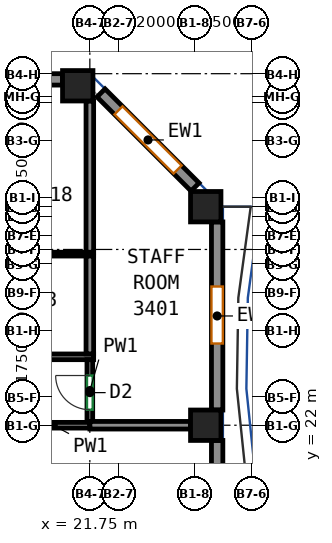
"""IFC4 building model, lengths in metres.
Left out: names, types, materials, properties, quantities, classifications, styles, units other than length and angle.
Written with IfcOpenShell. Run it as: python <this file> out.ifc"""

import sys

from ifc_helpers import new_model, si_unit, direction, frame, frame_2d, origin, origin_2d, place, context, subcontext, project, spatial, rectangle, extrude, source, transform, mapped, element, fill, save


model = new_model("IFC4")
c1 = context("Model", 3, precision=1e-05, world=origin(), true_north=direction((0.0, 1.0)))
c2 = subcontext(c1, "Body", "Model", "MODEL_VIEW")
j1 = project(units=[si_unit("LENGTHUNIT", "METRE"), si_unit("PLANEANGLEUNIT", "RADIAN")], contexts=[c1])
p1 = place(None, origin())
s1 = spatial("IfcSite", under=j1, at=p1, CompositionType="ELEMENT")
p2 = place(p1, origin())
s2 = spatial("IfcBuilding", under=s1, at=p2, CompositionType="ELEMENT")
p3 = place(p2, frame((0.0, 0.0, 150.7)))
s3 = spatial("IfcBuildingStorey", under=s2, at=p3, CompositionType="ELEMENT", Elevation=150.7)
m1 = source(origin(), c2, "Body", "SweptSolid", [
    extrude(rectangle(XDim=0.8, YDim=0.8, at=origin_2d()), origin(), (0.0, 0.0, 1.0), 3.12),
])
for number, where, z_axis, x_axis in (
    (1, (21.432, 30.932, 0.0), (0.0, 0.0, 1.0), (1.0, 0.0, 0.0)),
    (2, (24.8, 22.0, 0.0), (0.0, 0.0, 1.0), (1.0, 0.0, 0.0)),
    (3, (24.8, 27.75, 0.0), (0.0, 0.0, 1.0), (1.0, 0.0, 0.0)),
):
    element("IfcColumn", number, at=place(p3, frame(where, z_axis=z_axis, x_axis=x_axis)), inside=s3, PredefinedType="COLUMN", context=c2, shape_type="MappedRepresentation", body=[
        mapped(m1, transform((0.0, 0.0, 0.0))),
    ])
m2 = source(origin(), c2, "Body", "SweptSolid", [
    extrude(rectangle(XDim=13.2, YDim=0.3, at=frame_2d((6.6, 0.0))), origin(), (0.0, 0.0, 1.0), 3.12),
])
p4 = place(p3, frame((25.1, 8.4, 0.0), z_axis=(0.0, 0.0, 1.0), x_axis=(0.0, 1.0, 0.0)))
e4 = element("IfcWall", 4, at=p4, inside=s3, PredefinedType="SOLIDWALL", context=c2, shape_type="MappedRepresentation", body=[
    mapped(m2, transform((0.0, 0.0, 0.0))),
])
p5 = place(p4, frame((0.9, 0.0, 0.85)))
e5 = element("IfcOpeningElement", 5, at=p5, cuts=e4, PredefinedType="OPENING", context=c2, shape_type="SweptSolid", body=[
    extrude(rectangle(XDim=1.5, YDim=1.95, at=frame_2d((0.75, 0.975))), frame((0.0, 0.16, 0.0), z_axis=(0.0, -1.0, 0.0), x_axis=(1.0, 0.0, 0.0)), (0.0, 0.0, 1.0), 0.32),
])
p6 = place(p4, frame((4.2, 0.0, 0.85)))
e6 = element("IfcOpeningElement", 6, at=p6, cuts=e4, PredefinedType="OPENING", context=c2, shape_type="SweptSolid", body=[
    extrude(rectangle(XDim=1.5, YDim=1.95, at=frame_2d((0.75, 0.975))), frame((0.0, 0.16, 0.0), z_axis=(0.0, -1.0, 0.0), x_axis=(1.0, 0.0, 0.0)), (0.0, 0.0, 1.0), 0.32),
])
p7 = place(p4, frame((7.5, 0.0, 0.85)))
e7 = element("IfcOpeningElement", 7, at=p7, cuts=e4, PredefinedType="OPENING", context=c2, shape_type="SweptSolid", body=[
    extrude(rectangle(XDim=1.5, YDim=1.95, at=frame_2d((0.75, 0.975))), frame((0.0, 0.16, 0.0), z_axis=(0.0, -1.0, 0.0), x_axis=(1.0, 0.0, 0.0)), (0.0, 0.0, 1.0), 0.32),
])
p8 = place(p4, frame((10.8, 0.0, 0.85)))
e8 = element("IfcOpeningElement", 8, at=p8, cuts=e4, PredefinedType="OPENING", context=c2, shape_type="SweptSolid", body=[
    extrude(rectangle(XDim=1.5, YDim=1.95, at=frame_2d((0.75, 0.975))), frame((0.0, 0.16, 0.0), z_axis=(0.0, -1.0, 0.0), x_axis=(1.0, 0.0, 0.0)), (0.0, 0.0, 1.0), 0.32),
])
m3 = source(origin(), c2, "Body", "SweptSolid", [
    extrude(rectangle(XDim=4.95, YDim=0.3, at=frame_2d((2.475, 0.0))), origin(), (0.0, 0.0, 1.0), 3.12),
])
p9 = place(p3, frame((25.1, 22.4, 0.0), z_axis=(0.0, 0.0, 1.0), x_axis=(0.0, 1.0, 0.0)))
e9 = element("IfcWall", 9, at=p9, inside=s3, PredefinedType="SOLIDWALL", context=c2, shape_type="MappedRepresentation", body=[
    mapped(m3, transform((0.0, 0.0, 0.0))),
])
p10 = place(p9, frame((1.75, 0.0, 0.85)))
e10 = element("IfcOpeningElement", 10, at=p10, cuts=e9, PredefinedType="OPENING", context=c2, shape_type="SweptSolid", body=[
    extrude(rectangle(XDim=1.5, YDim=1.95, at=frame_2d((0.75, 0.975))), frame((0.0, 0.16, 0.0), z_axis=(0.0, -1.0, 0.0), x_axis=(1.0, 0.0, 0.0)), (0.0, 0.0, 1.0), 0.32),
])
m4 = source(origin(), c2, "Body", "SweptSolid", [
    extrude(rectangle(XDim=3.5, YDim=0.3, at=frame_2d((1.75, 0.0))), origin(), (0.0, 0.0, 1.0), 3.12),
])
p11 = place(p3, frame((24.519, 28.269, 0.0), z_axis=(0.0, 0.0, 1.0), x_axis=(-0.70707190453, 0.707141656123, 0.0)))
e11 = element("IfcWall", 11, at=p11, inside=s3, PredefinedType="SOLIDWALL", context=c2, shape_type="MappedRepresentation", body=[
    mapped(m4, transform((0.0, 0.0, 0.0))),
])
p12 = place(p11, frame((0.65, 0.0, 0.85)))
e12 = element("IfcOpeningElement", 12, at=p12, cuts=e11, PredefinedType="OPENING", context=c2, shape_type="SweptSolid", body=[
    extrude(rectangle(XDim=2.2, YDim=1.95, at=frame_2d((1.1, 0.975))), frame((0.0, 0.16, 0.0), z_axis=(0.0, -1.0, 0.0), x_axis=(1.0, 0.0, 0.0)), (0.0, 0.0, 1.0), 0.32),
])
m5 = source(origin(), c2, "Body", "SweptSolid", [
    extrude(rectangle(XDim=6.465, YDim=0.3, at=frame_2d((3.232, 0.0))), origin(), (0.0, 0.0, 1.0), 3.12),
])
p13 = place(p3, frame((21.032, 31.1, 0.0), z_axis=(0.0, 0.0, 1.0), x_axis=(-1.0, 0.0, 0.0)))
e13 = element("IfcWall", 13, at=p13, inside=s3, PredefinedType="SOLIDWALL", context=c2, shape_type="MappedRepresentation", body=[
    mapped(m5, transform((0.0, 0.0, 0.0))),
])
p14 = place(p13, frame((0.516, 0.0, 0.85)))
e14 = element("IfcOpeningElement", 14, at=p14, cuts=e13, PredefinedType="OPENING", context=c2, shape_type="SweptSolid", body=[
    extrude(rectangle(XDim=2.2, YDim=1.95, at=frame_2d((1.1, 0.975))), frame((0.0, 0.16, 0.0), z_axis=(0.0, -1.0, 0.0), x_axis=(1.0, 0.0, 0.0)), (0.0, 0.0, 1.0), 0.32),
])
p15 = place(p13, frame((3.749, 0.0, 0.85)))
e15 = element("IfcOpeningElement", 15, at=p15, cuts=e13, PredefinedType="OPENING", context=c2, shape_type="SweptSolid", body=[
    extrude(rectangle(XDim=2.2, YDim=1.95, at=frame_2d((1.1, 0.975))), frame((0.0, 0.16, 0.0), z_axis=(0.0, -1.0, 0.0), x_axis=(1.0, 0.0, 0.0)), (0.0, 0.0, 1.0), 0.32),
])
p16 = place(p3, frame((-20.059, 23.8, 0.0), z_axis=(0.0, 0.0, 1.0), x_axis=(1.0, 0.0, 0.0)))
e16 = element("IfcWall", 16, at=p16, inside=s3, PredefinedType="PARTITIONING", context=c2, shape_type="SweptSolid", body=[
    extrude(rectangle(XDim=41.909, YDim=0.15, at=frame_2d((20.955, 0.0))), origin(), (0.0, 0.0, 1.0), 3.12),
])
p17 = place(p16, frame((0.3, 0.0, 0.0)))
e17 = element("IfcOpeningElement", 17, at=p17, cuts=e16, PredefinedType="OPENING", context=c2, shape_type="SweptSolid", body=[
    extrude(rectangle(XDim=1.0, YDim=2.1, at=frame_2d((0.5, 1.05))), frame((0.0, 0.085, 0.0), z_axis=(0.0, -1.0, 0.0), x_axis=(1.0, 0.0, 0.0)), (0.0, 0.0, 1.0), 0.17),
])
p18 = place(p16, frame((6.391, 0.0, 0.0)))
e18 = element("IfcOpeningElement", 18, at=p18, cuts=e16, PredefinedType="OPENING", context=c2, shape_type="SweptSolid", body=[
    extrude(rectangle(XDim=1.0, YDim=2.1, at=frame_2d((0.5, 1.05))), frame((0.0, 0.085, 0.0), z_axis=(0.0, -1.0, 0.0), x_axis=(1.0, 0.0, 0.0)), (0.0, 0.0, 1.0), 0.17),
])
p19 = place(p16, frame((8.183, 0.0, 0.0)))
e19 = element("IfcOpeningElement", 19, at=p19, cuts=e16, PredefinedType="OPENING", context=c2, shape_type="SweptSolid", body=[
    extrude(rectangle(XDim=1.0, YDim=2.1, at=frame_2d((0.5, 1.05))), frame((0.0, 0.085, 0.0), z_axis=(0.0, -1.0, 0.0), x_axis=(1.0, 0.0, 0.0)), (0.0, 0.0, 1.0), 0.17),
])
p20 = place(p16, frame((13.872, 0.0, 0.0)))
e20 = element("IfcOpeningElement", 20, at=p20, cuts=e16, PredefinedType="OPENING", context=c2, shape_type="SweptSolid", body=[
    extrude(rectangle(XDim=1.0, YDim=2.1, at=frame_2d((0.5, 1.05))), frame((0.0, 0.085, 0.0), z_axis=(0.0, -1.0, 0.0), x_axis=(1.0, 0.0, 0.0)), (0.0, 0.0, 1.0), 0.17),
])
p21 = place(p16, frame((15.457, 0.0, 0.0)))
e21 = element("IfcOpeningElement", 21, at=p21, cuts=e16, PredefinedType="OPENING", context=c2, shape_type="SweptSolid", body=[
    extrude(rectangle(XDim=1.0, YDim=2.1, at=frame_2d((0.5, 1.05))), frame((0.0, 0.085, 0.0), z_axis=(0.0, -1.0, 0.0), x_axis=(1.0, 0.0, 0.0)), (0.0, 0.0, 1.0), 0.17),
])
p22 = place(p16, frame((21.199, 0.0, 0.0)))
e22 = element("IfcOpeningElement", 22, at=p22, cuts=e16, PredefinedType="OPENING", context=c2, shape_type="SweptSolid", body=[
    extrude(rectangle(XDim=1.0, YDim=2.1, at=frame_2d((0.5, 1.05))), frame((0.0, 0.085, 0.0), z_axis=(0.0, -1.0, 0.0), x_axis=(1.0, 0.0, 0.0)), (0.0, 0.0, 1.0), 0.17),
])
p23 = place(p16, frame((23.212, 0.0, 0.0)))
e23 = element("IfcOpeningElement", 23, at=p23, cuts=e16, PredefinedType="OPENING", context=c2, shape_type="SweptSolid", body=[
    extrude(rectangle(XDim=1.0, YDim=2.1, at=frame_2d((0.5, 1.05))), frame((0.0, 0.085, 0.0), z_axis=(0.0, -1.0, 0.0), x_axis=(1.0, 0.0, 0.0)), (0.0, 0.0, 1.0), 0.17),
])
p24 = place(p16, frame((28.832, 0.0, 0.0)))
e24 = element("IfcOpeningElement", 24, at=p24, cuts=e16, PredefinedType="OPENING", context=c2, shape_type="SweptSolid", body=[
    extrude(rectangle(XDim=1.0, YDim=2.1, at=frame_2d((0.5, 1.05))), frame((0.0, 0.085, 0.0), z_axis=(0.0, -1.0, 0.0), x_axis=(1.0, 0.0, 0.0)), (0.0, 0.0, 1.0), 0.17),
])
p25 = place(p16, frame((30.83, 0.0, 0.0)))
e25 = element("IfcOpeningElement", 25, at=p25, cuts=e16, PredefinedType="OPENING", context=c2, shape_type="SweptSolid", body=[
    extrude(rectangle(XDim=1.0, YDim=2.1, at=frame_2d((0.5, 1.05))), frame((0.0, 0.085, 0.0), z_axis=(0.0, -1.0, 0.0), x_axis=(1.0, 0.0, 0.0)), (0.0, 0.0, 1.0), 0.17),
])
p26 = place(p16, frame((36.519, 0.0, 0.0)))
e26 = element("IfcOpeningElement", 26, at=p26, cuts=e16, PredefinedType="OPENING", context=c2, shape_type="SweptSolid", body=[
    extrude(rectangle(XDim=1.0, YDim=2.1, at=frame_2d((0.5, 1.05))), frame((0.0, 0.085, 0.0), z_axis=(0.0, -1.0, 0.0), x_axis=(1.0, 0.0, 0.0)), (0.0, 0.0, 1.0), 0.17),
])
p27 = place(p16, frame((38.311, 0.0, 0.0)))
e27 = element("IfcOpeningElement", 27, at=p27, cuts=e16, PredefinedType="OPENING", context=c2, shape_type="SweptSolid", body=[
    extrude(rectangle(XDim=1.0, YDim=2.1, at=frame_2d((0.5, 1.05))), frame((0.0, 0.085, 0.0), z_axis=(0.0, -1.0, 0.0), x_axis=(1.0, 0.0, 0.0)), (0.0, 0.0, 1.0), 0.17),
])
p28 = place(p3, frame((21.75, 22.1, 0.0), z_axis=(0.0, 0.0, 1.0), x_axis=(0.0, 1.0, 0.0)))
e28 = element("IfcWall", 28, at=p28, inside=s3, PredefinedType="PARTITIONING", context=c2, shape_type="SweptSolid", body=[
    extrude(rectangle(XDim=1.625, YDim=0.15, at=frame_2d((0.812, 0.0))), origin(), (0.0, 0.0, 1.0), 3.12),
])
p29 = place(p28, frame((0.308, 0.0, 0.0)))
e29 = element("IfcOpeningElement", 29, at=p29, cuts=e28, PredefinedType="OPENING", context=c2, shape_type="SweptSolid", body=[
    extrude(rectangle(XDim=0.9, YDim=2.1, at=frame_2d((0.45, 1.05))), frame((0.0, 0.085, 0.0), z_axis=(0.0, -1.0, 0.0), x_axis=(1.0, 0.0, 0.0)), (0.0, 0.0, 1.0), 0.17),
])
p30 = place(p3, frame((19.825, 22.0, 0.0), z_axis=(0.0, 0.0, 1.0), x_axis=(1.0, 0.0, 0.0)))
e30 = element("IfcWall", 30, at=p30, inside=s3, PredefinedType="PARTITIONING", context=c2, shape_type="SweptSolid", body=[
    extrude(rectangle(XDim=1.925, YDim=0.15, at=frame_2d((0.962, 0.0))), origin(), (0.0, 0.0, 1.0), 3.12),
])
p31 = place(p3, frame((19.7, 26.502, 0.0), z_axis=(0.0, 0.0, 1.0), x_axis=(1.0, 0.0, 0.0)))
e31 = element("IfcWall", 31, at=p31, inside=s3, PredefinedType="PARTITIONING", context=c2, shape_type="SweptSolid", body=[
    extrude(rectangle(XDim=2.15, YDim=0.1, at=frame_2d((1.075, 0.0))), origin(), (0.0, 0.0, 1.0), 3.12),
])
p32 = place(p3, frame((21.75, 26.552, 0.0), z_axis=(0.0, 0.0, 1.0), x_axis=(0.0, 1.0, 0.0)))
e32 = element("IfcWall", 32, at=p32, inside=s3, PredefinedType="PARTITIONING", context=c2, shape_type="SweptSolid", body=[
    extrude(rectangle(XDim=3.98, YDim=0.2, at=frame_2d((1.99, 0.0))), origin(), (0.0, 0.0, 1.0), 3.12),
])
p33 = place(p3, frame((21.75, 23.877, 0.0), z_axis=(0.0, 0.0, 1.0), x_axis=(0.0, 1.0, 0.0)))
e33 = element("IfcWall", 33, at=p33, inside=s3, PredefinedType="PARTITIONING", context=c2, shape_type="SweptSolid", body=[
    extrude(rectangle(XDim=2.575, YDim=0.2, at=frame_2d((1.288, 0.0))), origin(), (0.0, 0.0, 1.0), 3.12),
])
p34 = place(p3, frame((21.752, 22.0, 0.0), z_axis=(0.0, 0.0, 1.0), x_axis=(1.0, 0.0, 0.0)))
e34 = element("IfcWall", 34, at=p34, inside=s3, PredefinedType="PARTITIONING", context=c2, shape_type="SweptSolid", body=[
    extrude(rectangle(XDim=2.648, YDim=0.2, at=frame_2d((1.324, 0.0))), origin(), (0.0, 0.0, 1.0), 3.12),
])
p35 = place(p10, origin())
e35 = element("IfcWindow", 35, at=p35, inside=s3, PartitioningType="SINGLE_PANEL", PredefinedType="WINDOW", context=c2, shape_type="SweptSolid", body=[
    extrude(rectangle(XDim=1.5, YDim=1.95, at=frame_2d((0.75, 0.975))), frame((0.0, 0.03, 0.0), z_axis=(0.0, -1.0, 0.0), x_axis=(1.0, 0.0, 0.0)), (0.0, 0.0, 1.0), 0.06),
])
fill(e10, e35)
p36 = place(p12, origin())
e36 = element("IfcWindow", 36, at=p36, inside=s3, PartitioningType="SINGLE_PANEL", PredefinedType="WINDOW", context=c2, shape_type="SweptSolid", body=[
    extrude(rectangle(XDim=2.2, YDim=1.95, at=frame_2d((1.1, 0.975))), frame((0.0, 0.03, 0.0), z_axis=(0.0, -1.0, 0.0), x_axis=(1.0, 0.0, 0.0)), (0.0, 0.0, 1.0), 0.06),
])
fill(e12, e36)
p37 = place(p29, origin())
e37 = element("IfcDoor", 37, at=p37, inside=s3, OperationType="SINGLE_SWING_RIGHT", PredefinedType="DOOR", context=c2, shape_type="SweptSolid", body=[
    extrude(rectangle(XDim=0.9, YDim=2.1, at=frame_2d((0.45, 1.05))), frame((0.0, 0.025, 0.0), z_axis=(0.0, -1.0, 0.0), x_axis=(1.0, 0.0, 0.0)), (0.0, 0.0, 1.0), 0.05),
])
fill(e29, e37)
save(model, sys.argv[1])
